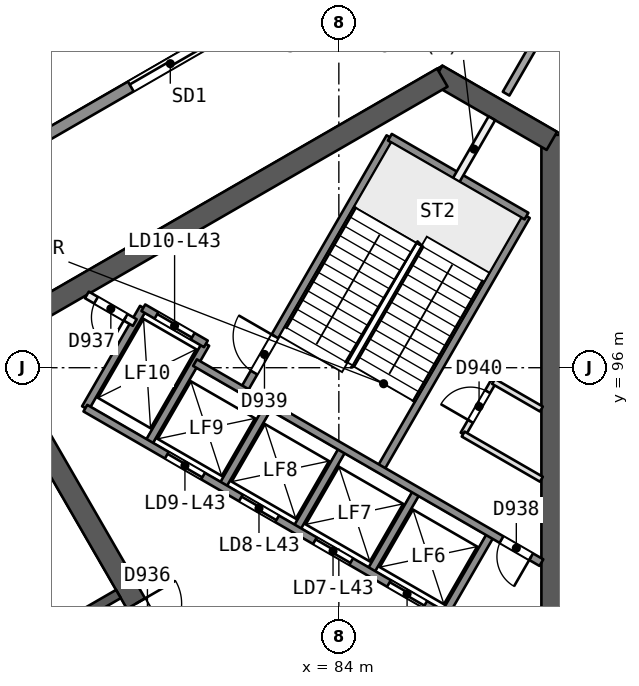
"""IFC4 building model, lengths in metres.
Left out: names, types, materials, properties, quantities, classifications, styles, units other than length and angle.
Written with IfcOpenShell. Run it as: python <this file> out.ifc"""

import sys

from ifc_helpers import new_model, si_unit, direction, frame, frame_2d, origin, place, context, subcontext, project, spatial, rectangle, extrude, element, fill, save


model = new_model("IFC4")
c1 = context("Model", 3, precision=1e-05, world=origin(), true_north=direction((0.0, 1.0)))
c2 = subcontext(c1, "Body", "Model", "MODEL_VIEW")
j1 = project(units=[si_unit("LENGTHUNIT", "METRE"), si_unit("PLANEANGLEUNIT", "RADIAN")], contexts=[c1])
p1 = place(None, origin())
s1 = spatial("IfcSite", under=j1, at=p1, CompositionType="ELEMENT")
p2 = place(p1, origin())
s2 = spatial("IfcBuilding", under=s1, at=p2, CompositionType="ELEMENT")
p3 = place(p2, frame((0.0, 0.0, 178.5)))
s3 = spatial("IfcBuildingStorey", under=s2, at=p3, CompositionType="ELEMENT", Elevation=178.5)
p4 = place(p3, frame((89.605, 88.069, 0.0), z_axis=(0.0, 0.0, 1.0), x_axis=(0.0, 1.0, 0.0)))
e1 = element("IfcWall", 1, at=p4, inside=s3, PredefinedType="SHEAR", context=c2, shape_type="SweptSolid", body=[
    extrude(rectangle(XDim=14.058, YDim=0.55, at=frame_2d((7.029, 0.0))), origin(), (0.0, 0.0, 1.0), 3.7),
])
p5 = place(p3, frame((89.605, 101.969, 0.0), z_axis=(0.0, 0.0, 1.0), x_axis=(-0.865997833373, 0.500047750313, 0.0)))
e2 = element("IfcWall", 2, at=p5, inside=s3, PredefinedType="SHEAR", context=c2, shape_type="SweptSolid", body=[
    extrude(rectangle(XDim=3.487, YDim=0.55, at=frame_2d((1.743, 0.0))), origin(), (0.0, 0.0, 1.0), 3.7),
])
p6 = place(p3, frame((86.723, 103.633, 0.0), z_axis=(0.0, 0.0, 1.0), x_axis=(-0.866023530946, -0.500003243837, 0.0)))
e3 = element("IfcWall", 3, at=p6, inside=s3, PredefinedType="SHEAR", context=c2, shape_type="SweptSolid", body=[
    extrude(rectangle(XDim=14.175, YDim=0.55, at=frame_2d((7.087, 0.0))), origin(), (0.0, 0.0, 1.0), 3.7),
])
p7 = place(p3, frame((74.686, 96.683, 0.0), z_axis=(0.0, 0.0, 1.0), x_axis=(0.499997818338, -0.866026663364, 0.0)))
e4 = element("IfcWall", 4, at=p7, inside=s3, PredefinedType="SHEAR", context=c2, shape_type="SweptSolid", body=[
    extrude(rectangle(XDim=10.105, YDim=0.55, at=frame_2d((5.052, 0.0))), origin(), (0.0, 0.0, 1.0), 3.7),
])
p8 = place(p7, frame((7.955, 0.0, 0.0)))
e5 = element("IfcOpeningElement", 5, at=p8, cuts=e4, PredefinedType="OPENING", context=c2, shape_type="SweptSolid", body=[
    extrude(rectangle(XDim=1.2, YDim=2.1, at=frame_2d((0.6, 1.05))), frame((0.0, 0.286, 0.0), z_axis=(0.0, -1.0, 0.0), x_axis=(1.0, 0.0, 0.0)), (0.0, 0.0, 1.0), 0.571),
])
p9 = place(p3, frame((78.2, 90.046, 0.0), z_axis=(0.0, 0.0, 1.0), x_axis=(-0.866026492143, -0.499998114903, 0.0)))
e6 = element("IfcWall", 6, at=p9, inside=s3, PredefinedType="SHEAR", context=c2, shape_type="SweptSolid", body=[
    extrude(rectangle(XDim=15.588, YDim=0.25, at=frame_2d((7.794, 0.0))), origin(), (0.0, 0.0, 1.0), 3.25),
])
p10 = place(p9, frame((2.306, 0.0, 0.0)))
e7 = element("IfcOpeningElement", 7, at=p10, cuts=e6, PredefinedType="OPENING", context=c2, shape_type="SweptSolid", body=[
    extrude(rectangle(XDim=1.0, YDim=2.1, at=frame_2d((0.5, 1.05))), frame((0.0, 0.135, 0.0), z_axis=(0.0, -1.0, 0.0), x_axis=(1.0, 0.0, 0.0)), (0.0, 0.0, 1.0), 0.271),
])
p11 = place(p9, frame((6.643, 0.0, 0.0)))
e8 = element("IfcOpeningElement", 8, at=p11, cuts=e6, PredefinedType="OPENING", context=c2, shape_type="SweptSolid", body=[
    extrude(rectangle(XDim=0.9, YDim=2.1, at=frame_2d((0.45, 1.05))), frame((0.0, 0.135, 0.0), z_axis=(0.0, -1.0, 0.0), x_axis=(1.0, 0.0, 0.0)), (0.0, 0.0, 1.0), 0.271),
])
p12 = place(p9, frame((9.604, 0.0, 0.0)))
e9 = element("IfcOpeningElement", 9, at=p12, cuts=e6, PredefinedType="OPENING", context=c2, shape_type="SweptSolid", body=[
    extrude(rectangle(XDim=0.9, YDim=2.1, at=frame_2d((0.45, 1.05))), frame((0.0, 0.135, 0.0), z_axis=(0.0, -1.0, 0.0), x_axis=(1.0, 0.0, 0.0)), (0.0, 0.0, 1.0), 0.271),
])
p13 = place(p9, frame((13.062, 0.0, 0.0)))
e10 = element("IfcOpeningElement", 10, at=p13, cuts=e6, PredefinedType="OPENING", context=c2, shape_type="SweptSolid", body=[
    extrude(rectangle(XDim=1.0, YDim=2.1, at=frame_2d((0.5, 1.05))), frame((0.0, 0.135, 0.0), z_axis=(0.0, -1.0, 0.0), x_axis=(1.0, 0.0, 0.0)), (0.0, 0.0, 1.0), 0.271),
])
p14 = place(p3, frame((91.07, 107.835, 0.0), z_axis=(0.0, 0.0, 1.0), x_axis=(-0.499970524249, -0.866042420948, 0.0)))
e11 = element("IfcWall", 11, at=p14, inside=s3, PredefinedType="PARTITIONING", context=c2, shape_type="SweptSolid", body=[
    extrude(rectangle(XDim=5.339, YDim=0.2, at=frame_2d((2.669, 0.0))), origin(), (0.0, 0.0, 1.0), 3.25),
])
p15 = place(p3, frame((72.136, 96.937, 0.0), z_axis=(0.0, 0.0, 1.0), x_axis=(0.499990139034, -0.866031096941, 0.0)))
e12 = element("IfcWall", 12, at=p15, inside=s3, PredefinedType="PARTITIONING", context=c2, shape_type="SweptSolid", body=[
    extrude(rectangle(XDim=9.0, YDim=0.2, at=frame_2d((4.5, 0.0))), origin(), (0.0, 0.0, 1.0), 3.25),
])
p16 = place(p3, frame((42.71, 82.722, 0.0), z_axis=(0.0, 0.0, 1.0), x_axis=(0.866026647012, 0.499997846661, 0.0)))
e13 = element("IfcWall", 13, at=p16, inside=s3, PredefinedType="SOLIDWALL", context=c2, shape_type="SweptSolid", body=[
    extrude(rectangle(XDim=53.206, YDim=0.3, at=frame_2d((26.603, 0.0))), origin(), (0.0, 0.0, 1.0), 3.25),
])
p17 = place(p16, frame((30.391, 0.0, 0.0)))
e14 = element("IfcOpeningElement", 14, at=p17, cuts=e13, PredefinedType="OPENING", context=c2, shape_type="SweptSolid", body=[
    extrude(rectangle(XDim=2.4, YDim=2.4, at=frame_2d((1.2, 1.2))), frame((0.0, 0.161, 0.0), z_axis=(0.0, -1.0, 0.0), x_axis=(1.0, 0.0, 0.0)), (0.0, 0.0, 1.0), 0.321),
])
p18 = place(p16, frame((41.356, 0.0, 0.0)))
e15 = element("IfcOpeningElement", 15, at=p18, cuts=e13, PredefinedType="OPENING", context=c2, shape_type="SweptSolid", body=[
    extrude(rectangle(XDim=2.4, YDim=2.4, at=frame_2d((1.2, 1.2))), frame((0.0, 0.161, 0.0), z_axis=(0.0, -1.0, 0.0), x_axis=(1.0, 0.0, 0.0)), (0.0, 0.0, 1.0), 0.321),
])
p19 = place(p16, frame((19.635, 0.0, 0.0)))
e16 = element("IfcOpeningElement", 16, at=p19, cuts=e13, PredefinedType="OPENING", context=c2, shape_type="SweptSolid", body=[
    extrude(rectangle(XDim=2.4, YDim=2.4, at=frame_2d((1.2, 1.2))), frame((0.0, 0.161, 0.0), z_axis=(0.0, -1.0, 0.0), x_axis=(1.0, 0.0, 0.0)), (0.0, 0.0, 1.0), 0.321),
])
p20 = place(p16, frame((9.4, 0.0, 0.0)))
e17 = element("IfcOpeningElement", 17, at=p20, cuts=e13, PredefinedType="OPENING", context=c2, shape_type="SweptSolid", body=[
    extrude(rectangle(XDim=2.4, YDim=2.4, at=frame_2d((1.2, 1.2))), frame((0.0, 0.161, 0.0), z_axis=(0.0, -1.0, 0.0), x_axis=(1.0, 0.0, 0.0)), (0.0, 0.0, 1.0), 0.321),
])
p21 = place(p16, frame((26.404, 0.0, 0.9)))
e18 = element("IfcOpeningElement", 18, at=p21, cuts=e13, PredefinedType="OPENING", context=c2, shape_type="SweptSolid", body=[
    extrude(rectangle(XDim=1.8, YDim=1.5, at=frame_2d((0.9, 0.75))), frame((0.0, 0.161, 0.0), z_axis=(0.0, -1.0, 0.0), x_axis=(1.0, 0.0, 0.0)), (0.0, 0.0, 1.0), 0.321),
])
p22 = place(p16, frame((23.442, 0.0, 0.9)))
e19 = element("IfcOpeningElement", 19, at=p22, cuts=e13, PredefinedType="OPENING", context=c2, shape_type="SweptSolid", body=[
    extrude(rectangle(XDim=1.8, YDim=1.5, at=frame_2d((0.9, 0.75))), frame((0.0, 0.161, 0.0), z_axis=(0.0, -1.0, 0.0), x_axis=(1.0, 0.0, 0.0)), (0.0, 0.0, 1.0), 0.321),
])
p23 = place(p3, frame((86.77, 89.486, 0.0), z_axis=(0.0, 0.0, 1.0), x_axis=(0.499961042966, 0.86604789447, 0.0)))
e20 = element("IfcWall", 20, at=p23, inside=s3, PredefinedType="SOLIDWALL", context=c2, shape_type="SweptSolid", body=[
    extrude(rectangle(XDim=2.48, YDim=0.2, at=frame_2d((1.24, 0.0))), origin(), (0.0, 0.0, 1.0), 3.25),
])
p24 = place(p3, frame((87.271, 94.254, 0.0), z_axis=(0.0, 0.0, 1.0), x_axis=(0.499995408039, 0.866028054938, 0.0)))
e21 = element("IfcWall", 21, at=p24, inside=s3, PredefinedType="PARTITIONING", context=c2, shape_type="SweptSolid", body=[
    extrude(rectangle(XDim=1.6, YDim=0.15, at=frame_2d((0.8, 0.0))), origin(), (0.0, 0.0, 1.0), 3.25),
])
p25 = place(p24, frame((0.387, 0.0, 0.0)))
e22 = element("IfcOpeningElement", 22, at=p25, cuts=e21, PredefinedType="OPENING", context=c2, shape_type="SweptSolid", body=[
    extrude(rectangle(XDim=0.9, YDim=2.1, at=frame_2d((0.45, 1.05))), frame((0.0, 0.085, 0.0), z_axis=(0.0, -1.0, 0.0), x_axis=(1.0, 0.0, 0.0)), (0.0, 0.0, 1.0), 0.171),
])
p26 = place(p3, frame((84.821, 90.611, 0.0), z_axis=(0.0, 0.0, 1.0), x_axis=(0.499961042966, 0.86604789447, 0.0)))
e23 = element("IfcWall", 23, at=p26, inside=s3, PredefinedType="SOLIDWALL", context=c2, shape_type="SweptSolid", body=[
    extrude(rectangle(XDim=2.48, YDim=0.2, at=frame_2d((1.24, 0.0))), origin(), (0.0, 0.0, 1.0), 3.25),
])
p27 = place(p3, frame((85.087, 93.321, 0.0), z_axis=(0.0, 0.0, 1.0), x_axis=(0.500019787375, 0.866013979237, 0.0)))
e24 = element("IfcWall", 24, at=p27, inside=s3, PredefinedType="SOLIDWALL", context=c2, shape_type="SweptSolid", body=[
    extrude(rectangle(XDim=7.7, YDim=0.2, at=frame_2d((3.85, 0.0))), origin(), (0.0, 0.0, 1.0), 3.25),
])
p28 = place(p3, frame((82.873, 91.736, 0.0), z_axis=(0.0, 0.0, 1.0), x_axis=(0.499961042966, 0.86604789447, 0.0)))
e25 = element("IfcWall", 25, at=p28, inside=s3, PredefinedType="SOLIDWALL", context=c2, shape_type="SweptSolid", body=[
    extrude(rectangle(XDim=2.48, YDim=0.2, at=frame_2d((1.24, 0.0))), origin(), (0.0, 0.0, 1.0), 3.25),
])
p29 = place(p3, frame((87.09, 100.94, 0.0), z_axis=(0.0, 0.0, 1.0), x_axis=(0.499951854219, 0.86605319898, 0.0)))
e26 = element("IfcWall", 26, at=p29, inside=s3, PredefinedType="PARTITIONING", context=c2, shape_type="SweptSolid", body=[
    extrude(rectangle(XDim=1.873, YDim=0.2, at=frame_2d((0.937, 0.0))), origin(), (0.0, 0.0, 1.0), 3.25),
])
p30 = place(p3, frame((80.924, 92.861, 0.0), z_axis=(0.0, 0.0, 1.0), x_axis=(0.499961042966, 0.86604789447, 0.0)))
e27 = element("IfcWall", 27, at=p30, inside=s3, PredefinedType="SOLIDWALL", context=c2, shape_type="SweptSolid", body=[
    extrude(rectangle(XDim=2.48, YDim=0.2, at=frame_2d((1.24, 0.0))), origin(), (0.0, 0.0, 1.0), 3.25),
])
p31 = place(p3, frame((81.493, 95.396, 0.0), z_axis=(0.0, 0.0, 1.0), x_axis=(0.500006057782, 0.866021906294, 0.0)))
e28 = element("IfcWall", 28, at=p31, inside=s3, PredefinedType="SOLIDWALL", context=c2, shape_type="SweptSolid", body=[
    extrude(rectangle(XDim=7.7, YDim=0.2, at=frame_2d((3.85, 0.0))), origin(), (0.0, 0.0, 1.0), 3.25),
])
p32 = place(p31, frame((0.55, 0.0, 0.0)))
e29 = element("IfcOpeningElement", 29, at=p32, cuts=e28, PredefinedType="OPENING", context=c2, shape_type="SweptSolid", body=[
    extrude(rectangle(XDim=1.1, YDim=2.1, at=frame_2d((0.55, 1.05))), frame((0.0, 0.11, 0.0), z_axis=(0.0, -1.0, 0.0), x_axis=(1.0, 0.0, 0.0)), (0.0, 0.0, 1.0), 0.221),
])
for number, where, z_axis, x_axis in (
    (30, (78.976, 93.986, 0.0), (0.0, 0.0, 1.0), (0.5, 0.866, 0.0)),
    (31, (77.33, 94.936, 0.0), (0.0, 0.0, 1.0), (0.5, 0.866, 0.0)),
):
    element("IfcWall", number, at=place(p3, frame(where, z_axis=z_axis, x_axis=x_axis)), inside=s3, PredefinedType="SOLIDWALL", context=c2, shape_type="SweptSolid", body=[
        extrude(rectangle(XDim=3.05, YDim=0.2, at=frame_2d((1.525, 0.0))), origin(), (0.0, 0.0, 1.0), 3.25),
    ])
p33 = place(p3, frame((86.77, 89.486, 0.0), z_axis=(0.0, 0.0, 1.0), x_axis=(-0.86601811187, 0.500012629753, 0.0)))
e32 = element("IfcWall", 32, at=p33, inside=s3, PredefinedType="SOLIDWALL", context=c2, shape_type="SweptSolid", body=[
    extrude(rectangle(XDim=10.9, YDim=0.2, at=frame_2d((5.45, 0.0))), origin(), (0.0, 0.0, 1.0), 3.25),
])
p34 = place(p33, frame((0.575, 0.0, 0.0)))
e33 = element("IfcOpeningElement", 33, at=p34, cuts=e32, PredefinedType="OPENING", context=c2, shape_type="SweptSolid", body=[
    extrude(rectangle(XDim=1.1, YDim=2.1, at=frame_2d((0.55, 1.05))), frame((0.0, 0.11, 0.0), z_axis=(0.0, -1.0, 0.0), x_axis=(1.0, 0.0, 0.0)), (0.0, 0.0, 1.0), 0.221),
])
p35 = place(p33, frame((2.825, 0.0, 0.0)))
e34 = element("IfcOpeningElement", 34, at=p35, cuts=e32, PredefinedType="OPENING", context=c2, shape_type="SweptSolid", body=[
    extrude(rectangle(XDim=1.1, YDim=2.1, at=frame_2d((0.55, 1.05))), frame((0.0, 0.11, 0.0), z_axis=(0.0, -1.0, 0.0), x_axis=(1.0, 0.0, 0.0)), (0.0, 0.0, 1.0), 0.221),
])
p36 = place(p33, frame((5.075, 0.0, 0.0)))
e35 = element("IfcOpeningElement", 35, at=p36, cuts=e32, PredefinedType="OPENING", context=c2, shape_type="SweptSolid", body=[
    extrude(rectangle(XDim=1.1, YDim=2.1, at=frame_2d((0.55, 1.05))), frame((0.0, 0.11, 0.0), z_axis=(0.0, -1.0, 0.0), x_axis=(1.0, 0.0, 0.0)), (0.0, 0.0, 1.0), 0.221),
])
p37 = place(p33, frame((7.325, 0.0, 0.0)))
e36 = element("IfcOpeningElement", 36, at=p37, cuts=e32, PredefinedType="OPENING", context=c2, shape_type="SweptSolid", body=[
    extrude(rectangle(XDim=1.1, YDim=2.1, at=frame_2d((0.55, 1.05))), frame((0.0, 0.11, 0.0), z_axis=(0.0, -1.0, 0.0), x_axis=(1.0, 0.0, 0.0)), (0.0, 0.0, 1.0), 0.221),
])
p38 = place(p3, frame((89.33, 90.872, 0.0), z_axis=(0.0, 0.0, 1.0), x_axis=(-0.866027589512, 0.49999621419, 0.0)))
e37 = element("IfcWall", 37, at=p38, inside=s3, PredefinedType="SOLIDWALL", context=c2, shape_type="SweptSolid", body=[
    extrude(rectangle(XDim=10.524, YDim=0.2, at=frame_2d((5.262, 0.0))), origin(), (0.0, 0.0, 1.0), 3.25),
])
p39 = place(p38, frame((0.312, 0.0, 0.0)))
e38 = element("IfcOpeningElement", 38, at=p39, cuts=e37, PredefinedType="OPENING", context=c2, shape_type="SweptSolid", body=[
    extrude(rectangle(XDim=0.9, YDim=2.1, at=frame_2d((0.45, 1.05))), frame((0.0, 0.11, 0.0), z_axis=(0.0, -1.0, 0.0), x_axis=(1.0, 0.0, 0.0)), (0.0, 0.0, 1.0), 0.221),
])
p40 = place(p3, frame((78.63, 97.188, 0.0), z_axis=(0.0, 0.0, 1.0), x_axis=(-0.866003949776, 0.500037157592, 0.0)))
e39 = element("IfcWall", 39, at=p40, inside=s3, PredefinedType="PARTITIONING", context=c2, shape_type="SweptSolid", body=[
    extrude(rectangle(XDim=1.455, YDim=0.2, at=frame_2d((0.728, 0.0))), origin(), (0.0, 0.0, 1.0), 3.25),
])
p41 = place(p40, frame((0.278, 0.0, 0.0)))
e40 = element("IfcOpeningElement", 40, at=p41, cuts=e39, PredefinedType="OPENING", context=c2, shape_type="SweptSolid", body=[
    extrude(rectangle(XDim=0.9, YDim=2.1, at=frame_2d((0.45, 1.05))), frame((0.0, 0.11, 0.0), z_axis=(0.0, -1.0, 0.0), x_axis=(1.0, 0.0, 0.0)), (0.0, 0.0, 1.0), 0.221),
])
p42 = place(p3, frame((80.5, 96.627, 0.0), z_axis=(0.0, 0.0, 1.0), x_axis=(-0.86601224135, 0.500022797313, 0.0)))
e41 = element("IfcWall", 41, at=p42, inside=s3, PredefinedType="SOLIDWALL", context=c2, shape_type="SweptSolid", body=[
    extrude(rectangle(XDim=1.9, YDim=0.2, at=frame_2d((0.95, 0.0))), origin(), (0.0, 0.0, 1.0), 3.25),
])
p43 = place(p42, frame((0.4, 0.0, 0.0)))
e42 = element("IfcOpeningElement", 42, at=p43, cuts=e41, PredefinedType="OPENING", context=c2, shape_type="SweptSolid", body=[
    extrude(rectangle(XDim=1.1, YDim=2.1, at=frame_2d((0.55, 1.05))), frame((0.0, 0.11, 0.0), z_axis=(0.0, -1.0, 0.0), x_axis=(1.0, 0.0, 0.0)), (0.0, 0.0, 1.0), 0.221),
])
p44 = place(p3, frame((89.33, 93.065, 0.0), z_axis=(0.0, 0.0, 1.0), x_axis=(-0.866041951395, 0.499971337603, 0.0)))
e43 = element("IfcWall", 43, at=p44, inside=s3, PredefinedType="PARTITIONING", context=c2, shape_type="SweptSolid", body=[
    extrude(rectangle(XDim=2.378, YDim=0.15, at=frame_2d((1.189, 0.0))), origin(), (0.0, 0.0, 1.0), 3.25),
])
p45 = place(p3, frame((89.33, 94.913, 0.0), z_axis=(0.0, 0.0, 1.0), x_axis=(-0.865981433661, 0.500076150755, 0.0)))
e44 = element("IfcWall", 44, at=p45, inside=s3, PredefinedType="PARTITIONING", context=c2, shape_type="SweptSolid", body=[
    extrude(rectangle(XDim=1.454, YDim=0.15, at=frame_2d((0.727, 0.0))), origin(), (0.0, 0.0, 1.0), 3.25),
])
p46 = place(p3, frame((88.937, 99.99, 0.0), z_axis=(0.0, 0.0, 1.0), x_axis=(-0.866004344652, 0.500036473714, 0.0)))
e45 = element("IfcWall", 45, at=p46, inside=s3, PredefinedType="SOLIDWALL", context=c2, shape_type="SweptSolid", body=[
    extrude(rectangle(XDim=4.15, YDim=0.2, at=frame_2d((2.075, 0.0))), origin(), (0.0, 0.0, 1.0), 3.25),
])
p47 = place(p18, origin())
e46 = element("IfcDoor", 46, at=p47, inside=s3, OperationType="SLIDING_TO_RIGHT", PredefinedType="NOTDEFINED", context=c2, shape_type="SweptSolid", body=[
    extrude(rectangle(XDim=2.4, YDim=2.4, at=frame_2d((1.2, 1.2))), frame((0.0, 0.025, 0.0), z_axis=(0.0, -1.0, 0.0), x_axis=(1.0, 0.0, 0.0)), (0.0, 0.0, 1.0), 0.05),
])
fill(e15, e46)
p48 = place(p8, origin())
e47 = element("IfcDoor", 47, at=p48, inside=s3, OperationType="SINGLE_SWING_LEFT", PredefinedType="NOTDEFINED", context=c2, shape_type="SweptSolid", body=[
    extrude(rectangle(XDim=1.2, YDim=2.1, at=frame_2d((0.6, 1.05))), frame((0.0, 0.025, 0.0), z_axis=(0.0, -1.0, 0.0), x_axis=(1.0, 0.0, 0.0)), (0.0, 0.0, 1.0), 0.05),
])
fill(e5, e47)
p49 = place(p34, origin())
e48 = element("IfcDoor", 48, at=p49, inside=s3, OperationType="SLIDING_TO_RIGHT", PredefinedType="NOTDEFINED", context=c2, shape_type="SweptSolid", body=[
    extrude(rectangle(XDim=1.1, YDim=2.1, at=frame_2d((0.55, 1.05))), frame((0.0, 0.025, 0.0), z_axis=(0.0, -1.0, 0.0), x_axis=(1.0, 0.0, 0.0)), (0.0, 0.0, 1.0), 0.05),
])
fill(e33, e48)
p50 = place(p35, origin())
e49 = element("IfcDoor", 49, at=p50, inside=s3, OperationType="SLIDING_TO_LEFT", PredefinedType="NOTDEFINED", context=c2, shape_type="SweptSolid", body=[
    extrude(rectangle(XDim=1.1, YDim=2.1, at=frame_2d((0.55, 1.05))), frame((0.0, 0.025, 0.0), z_axis=(0.0, -1.0, 0.0), x_axis=(1.0, 0.0, 0.0)), (0.0, 0.0, 1.0), 0.05),
])
fill(e34, e49)
p51 = place(p36, origin())
e50 = element("IfcDoor", 50, at=p51, inside=s3, OperationType="SLIDING_TO_RIGHT", PredefinedType="NOTDEFINED", context=c2, shape_type="SweptSolid", body=[
    extrude(rectangle(XDim=1.1, YDim=2.1, at=frame_2d((0.55, 1.05))), frame((0.0, 0.025, 0.0), z_axis=(0.0, -1.0, 0.0), x_axis=(1.0, 0.0, 0.0)), (0.0, 0.0, 1.0), 0.05),
])
fill(e35, e50)
p52 = place(p37, origin())
e51 = element("IfcDoor", 51, at=p52, inside=s3, OperationType="SLIDING_TO_LEFT", PredefinedType="NOTDEFINED", context=c2, shape_type="SweptSolid", body=[
    extrude(rectangle(XDim=1.1, YDim=2.1, at=frame_2d((0.55, 1.05))), frame((0.0, 0.025, 0.0), z_axis=(0.0, -1.0, 0.0), x_axis=(1.0, 0.0, 0.0)), (0.0, 0.0, 1.0), 0.05),
])
fill(e36, e51)
p53 = place(p43, origin())
e52 = element("IfcDoor", 52, at=p53, inside=s3, OperationType="SLIDING_TO_RIGHT", PredefinedType="NOTDEFINED", context=c2, shape_type="SweptSolid", body=[
    extrude(rectangle(XDim=1.1, YDim=2.1, at=frame_2d((0.55, 1.05))), frame((0.0, 0.025, 0.0), z_axis=(0.0, -1.0, 0.0), x_axis=(1.0, 0.0, 0.0)), (0.0, 0.0, 1.0), 0.05),
])
fill(e42, e52)
p54 = place(p41, origin())
e53 = element("IfcDoor", 53, at=p54, inside=s3, OperationType="SINGLE_SWING_LEFT", PredefinedType="NOTDEFINED", context=c2, shape_type="SweptSolid", body=[
    extrude(rectangle(XDim=0.9, YDim=2.1, at=frame_2d((0.45, 1.05))), frame((0.0, 0.025, 0.0), z_axis=(0.0, -1.0, 0.0), x_axis=(1.0, 0.0, 0.0)), (0.0, 0.0, 1.0), 0.05),
])
fill(e40, e53)
p55 = place(p39, origin())
e54 = element("IfcDoor", 54, at=p55, inside=s3, OperationType="SINGLE_SWING_LEFT", PredefinedType="NOTDEFINED", context=c2, shape_type="SweptSolid", body=[
    extrude(rectangle(XDim=0.9, YDim=2.1, at=frame_2d((0.45, 1.05))), frame((0.0, 0.025, 0.0), z_axis=(0.0, -1.0, 0.0), x_axis=(1.0, 0.0, 0.0)), (0.0, 0.0, 1.0), 0.05),
])
fill(e38, e54)
p56 = place(p32, origin())
e55 = element("IfcDoor", 55, at=p56, inside=s3, OperationType="SINGLE_SWING_RIGHT", PredefinedType="NOTDEFINED", context=c2, shape_type="SweptSolid", body=[
    extrude(rectangle(XDim=1.1, YDim=2.1, at=frame_2d((0.55, 1.05))), frame((0.0, 0.025, 0.0), z_axis=(0.0, -1.0, 0.0), x_axis=(1.0, 0.0, 0.0)), (0.0, 0.0, 1.0), 0.05),
])
fill(e29, e55)
p57 = place(p25, origin())
e56 = element("IfcDoor", 56, at=p57, inside=s3, OperationType="SINGLE_SWING_LEFT", PredefinedType="NOTDEFINED", context=c2, shape_type="SweptSolid", body=[
    extrude(rectangle(XDim=0.9, YDim=2.1, at=frame_2d((0.45, 1.05))), frame((0.0, 0.025, 0.0), z_axis=(0.0, -1.0, 0.0), x_axis=(1.0, 0.0, 0.0)), (0.0, 0.0, 1.0), 0.05),
])
fill(e22, e56)
save(model, sys.argv[1])
